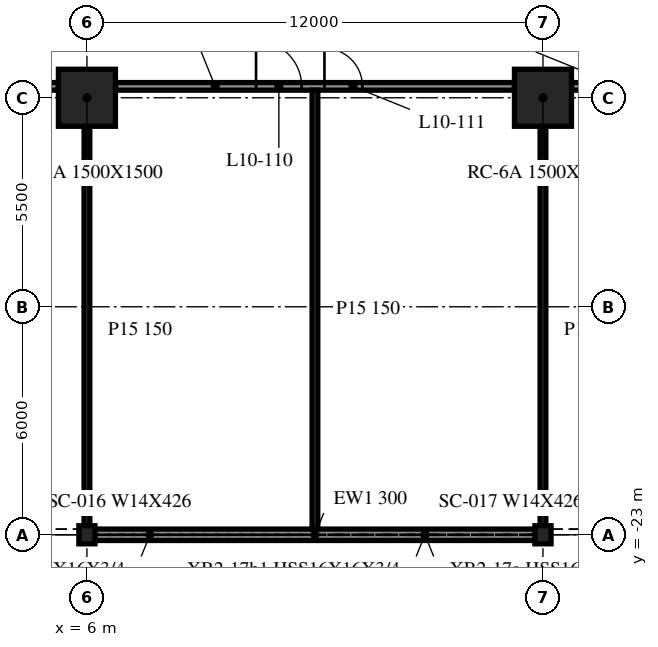
"""IFC4 building model, lengths in metres.
Left out: names, types, materials, properties, quantities, classifications, styles, units other than length and angle.
Written with IfcOpenShell. Run it as: python <this file> out.ifc"""

import sys

from ifc_helpers import new_model, si_unit, direction, frame, frame_2d, origin, origin_2d, place, context, subcontext, project, spatial, rectangle, i_section, extrude, element, fill, save


model = new_model("IFC4")
c1 = context("Model", 3, precision=1e-05, world=origin(), true_north=direction((0.0, 1.0)))
c2 = subcontext(c1, "Body", "Model", "MODEL_VIEW")
j1 = project(units=[si_unit("LENGTHUNIT", "METRE"), si_unit("PLANEANGLEUNIT", "RADIAN")], contexts=[c1])
p1 = place(None, origin())
s1 = spatial("IfcSite", under=j1, at=p1, CompositionType="ELEMENT")
p2 = place(p1, origin())
s2 = spatial("IfcBuilding", under=s1, at=p2, CompositionType="ELEMENT")
p3 = place(p2, frame((0.0, 0.0, 46.0)))
s3 = spatial("IfcBuildingStorey", under=s2, at=p3, CompositionType="ELEMENT", Elevation=46.0)
for number, where, z_axis, x_axis in (
    (1, (6.0, -11.5, -0.34), (0.0, 0.0, 1.0), (1.0, 0.0, 0.0)),
    (2, (18.0, -11.5, -0.34), (0.0, 0.0, 1.0), (1.0, 0.0, 0.0)),
):
    element("IfcColumn", number, at=place(p3, frame(where, z_axis=z_axis, x_axis=x_axis)), inside=s3, PredefinedType="COLUMN", context=c2, shape_type="SweptSolid", body=[
        extrude(rectangle(XDim=1.5, YDim=1.5, at=origin_2d()), origin(), (0.0, 0.0, 1.0), 4.3),
    ])
for number, where, z_axis, x_axis in (
    (3, (6.0, -23.0, -0.34), (0.0, 0.0, 1.0), (1.0, 0.0, 0.0)),
    (4, (18.0, -23.0, -0.34), (0.0, 0.0, 1.0), (1.0, 0.0, 0.0)),
):
    element("IfcColumn", number, at=place(p3, frame(where, z_axis=z_axis, x_axis=x_axis)), inside=s3, PredefinedType="COLUMN", context=c2, shape_type="SweptSolid", body=[
        extrude(i_section(OverallWidth=0.424, OverallDepth=0.475, WebThickness=0.048, FlangeThickness=0.077, at=origin_2d()), origin(), (0.0, 0.0, 1.0), 4.3),
    ])
p4 = place(p3, frame((6.024, -23.0, 0.0), z_axis=(0.0, 0.0, 1.0), x_axis=(1.0, 0.0, 0.0)))
e5 = element("IfcWall", 5, at=p4, inside=s3, PredefinedType="NOTDEFINED", context=c2, shape_type="SweptSolid", body=[
    extrude(rectangle(XDim=11.952, YDim=0.3, at=frame_2d((5.976, 0.0))), origin(), (0.0, 0.0, 1.0), 3.203),
])
p5 = place(p3, frame((-5.25, -11.2, 0.0), z_axis=(0.0, 0.0, 1.0), x_axis=(1.0, 0.0, 0.0)))
e6 = element("IfcWall", 6, at=p5, inside=s3, PredefinedType="PARTITIONING", context=c2, shape_type="SweptSolid", body=[
    extrude(rectangle(XDim=10.5, YDim=0.2, at=frame_2d((5.25, 0.0))), origin(), (0.0, 0.0, 1.0), 3.96),
])
p6 = place(p5, frame((3.9, 0.0, 0.0)))
e7 = element("IfcOpeningElement", 7, at=p6, cuts=e6, PredefinedType="OPENING", context=c2, shape_type="SweptSolid", body=[
    extrude(rectangle(XDim=1.0, YDim=2.1, at=frame_2d((0.5, 1.05))), frame((0.0, 0.11, 0.0), z_axis=(0.0, -1.0, 0.0), x_axis=(1.0, 0.0, 0.0)), (0.0, 0.0, 1.0), 0.22),
])
p7 = place(p5, frame((5.5, 0.0, 0.0)))
e8 = element("IfcOpeningElement", 8, at=p7, cuts=e6, PredefinedType="OPENING", context=c2, shape_type="SweptSolid", body=[
    extrude(rectangle(XDim=1.2, YDim=2.1, at=frame_2d((0.6, 1.05))), frame((0.0, 0.11, 0.0), z_axis=(0.0, -1.0, 0.0), x_axis=(1.0, 0.0, 0.0)), (0.0, 0.0, 1.0), 0.22),
])
p8 = place(p3, frame((6.75, -11.2, 0.0), z_axis=(0.0, 0.0, 1.0), x_axis=(1.0, 0.0, 0.0)))
e9 = element("IfcWall", 9, at=p8, inside=s3, PredefinedType="PARTITIONING", context=c2, shape_type="SweptSolid", body=[
    extrude(rectangle(XDim=10.5, YDim=0.2, at=frame_2d((5.25, 0.0))), origin(), (0.0, 0.0, 1.0), 3.96),
])
p9 = place(p8, frame((3.7, 0.0, 0.0)))
e10 = element("IfcOpeningElement", 10, at=p9, cuts=e9, PredefinedType="OPENING", context=c2, shape_type="SweptSolid", body=[
    extrude(rectangle(XDim=1.2, YDim=2.1, at=frame_2d((0.6, 1.05))), frame((0.0, 0.11, 0.0), z_axis=(0.0, -1.0, 0.0), x_axis=(1.0, 0.0, 0.0)), (0.0, 0.0, 1.0), 0.22),
])
p10 = place(p8, frame((5.5, 0.0, 0.0)))
e11 = element("IfcOpeningElement", 11, at=p10, cuts=e9, PredefinedType="OPENING", context=c2, shape_type="SweptSolid", body=[
    extrude(rectangle(XDim=1.0, YDim=2.1, at=frame_2d((0.5, 1.05))), frame((0.0, 0.11, 0.0), z_axis=(0.0, -1.0, 0.0), x_axis=(1.0, 0.0, 0.0)), (0.0, 0.0, 1.0), 0.22),
])
p11 = place(p3, frame((18.75, -11.2, 0.0), z_axis=(0.0, 0.0, 1.0), x_axis=(1.0, 0.0, 0.0)))
e12 = element("IfcWall", 12, at=p11, inside=s3, PredefinedType="PARTITIONING", context=c2, shape_type="SweptSolid", body=[
    extrude(rectangle(XDim=10.5, YDim=0.2, at=frame_2d((5.25, 0.0))), origin(), (0.0, 0.0, 1.0), 3.96),
])
p12 = place(p11, frame((0.7, 0.0, 0.0)))
e13 = element("IfcOpeningElement", 13, at=p12, cuts=e12, PredefinedType="OPENING", context=c2, shape_type="SweptSolid", body=[
    extrude(rectangle(XDim=1.2, YDim=2.1, at=frame_2d((0.6, 1.05))), frame((0.0, 0.11, 0.0), z_axis=(0.0, -1.0, 0.0), x_axis=(1.0, 0.0, 0.0)), (0.0, 0.0, 1.0), 0.22),
])
p13 = place(p11, frame((4.7, 0.0, 0.0)))
e14 = element("IfcOpeningElement", 14, at=p13, cuts=e12, PredefinedType="OPENING", context=c2, shape_type="SweptSolid", body=[
    extrude(rectangle(XDim=1.2, YDim=2.1, at=frame_2d((0.6, 1.05))), frame((0.0, 0.11, 0.0), z_axis=(0.0, -1.0, 0.0), x_axis=(1.0, 0.0, 0.0)), (0.0, 0.0, 1.0), 0.22),
])
p14 = place(p11, frame((8.5, 0.0, 0.0)))
e15 = element("IfcOpeningElement", 15, at=p14, cuts=e12, PredefinedType="OPENING", context=c2, shape_type="SweptSolid", body=[
    extrude(rectangle(XDim=1.0, YDim=2.1, at=frame_2d((0.5, 1.05))), frame((0.0, 0.11, 0.0), z_axis=(0.0, -1.0, 0.0), x_axis=(1.0, 0.0, 0.0)), (0.0, 0.0, 1.0), 0.22),
])
p15 = place(p3, frame((6.0, -22.975, 0.0), z_axis=(0.0, 0.0, 1.0), x_axis=(0.0, 1.0, 0.0)))
e16 = element("IfcWall", 16, at=p15, inside=s3, PredefinedType="PARTITIONING", context=c2, shape_type="SweptSolid", body=[
    extrude(rectangle(XDim=10.725, YDim=0.15, at=frame_2d((5.363, 0.0))), origin(), (0.0, 0.0, 1.0), 3.96),
])
p16 = place(p3, frame((12.0, -22.85, 0.0), z_axis=(0.0, 0.0, 1.0), x_axis=(0.0, 1.0, 0.0)))
e17 = element("IfcWall", 17, at=p16, inside=s3, PredefinedType="PARTITIONING", context=c2, shape_type="SweptSolid", body=[
    extrude(rectangle(XDim=11.55, YDim=0.15, at=frame_2d((5.775, 0.0))), origin(), (0.0, 0.0, 1.0), 3.96),
])
p17 = place(p3, frame((18.0, -22.975, 0.0), z_axis=(0.0, 0.0, 1.0), x_axis=(0.0, 1.0, 0.0)))
e18 = element("IfcWall", 18, at=p17, inside=s3, PredefinedType="PARTITIONING", context=c2, shape_type="SweptSolid", body=[
    extrude(rectangle(XDim=10.725, YDim=0.15, at=frame_2d((5.363, 0.0))), origin(), (0.0, 0.0, 1.0), 3.96),
])
p18 = place(p9, origin())
e19 = element("IfcDoor", 19, at=p18, inside=s3, OperationType="SINGLE_SWING_RIGHT", PredefinedType="DOOR", context=c2, shape_type="SweptSolid", body=[
    extrude(rectangle(XDim=1.2, YDim=2.1, at=frame_2d((0.6, 1.05))), frame((0.0, 0.025, 0.0), z_axis=(0.0, -1.0, 0.0), x_axis=(1.0, 0.0, 0.0)), (0.0, 0.0, 1.0), 0.05),
])
fill(e10, e19)
p19 = place(p10, origin())
e20 = element("IfcDoor", 20, at=p19, inside=s3, OperationType="SINGLE_SWING_LEFT", PredefinedType="DOOR", context=c2, shape_type="SweptSolid", body=[
    extrude(rectangle(XDim=1.0, YDim=2.1, at=frame_2d((0.5, 1.05))), frame((0.0, 0.025, 0.0), z_axis=(0.0, -1.0, 0.0), x_axis=(1.0, 0.0, 0.0)), (0.0, 0.0, 1.0), 0.05),
])
fill(e11, e20)
save(model, sys.argv[1])
